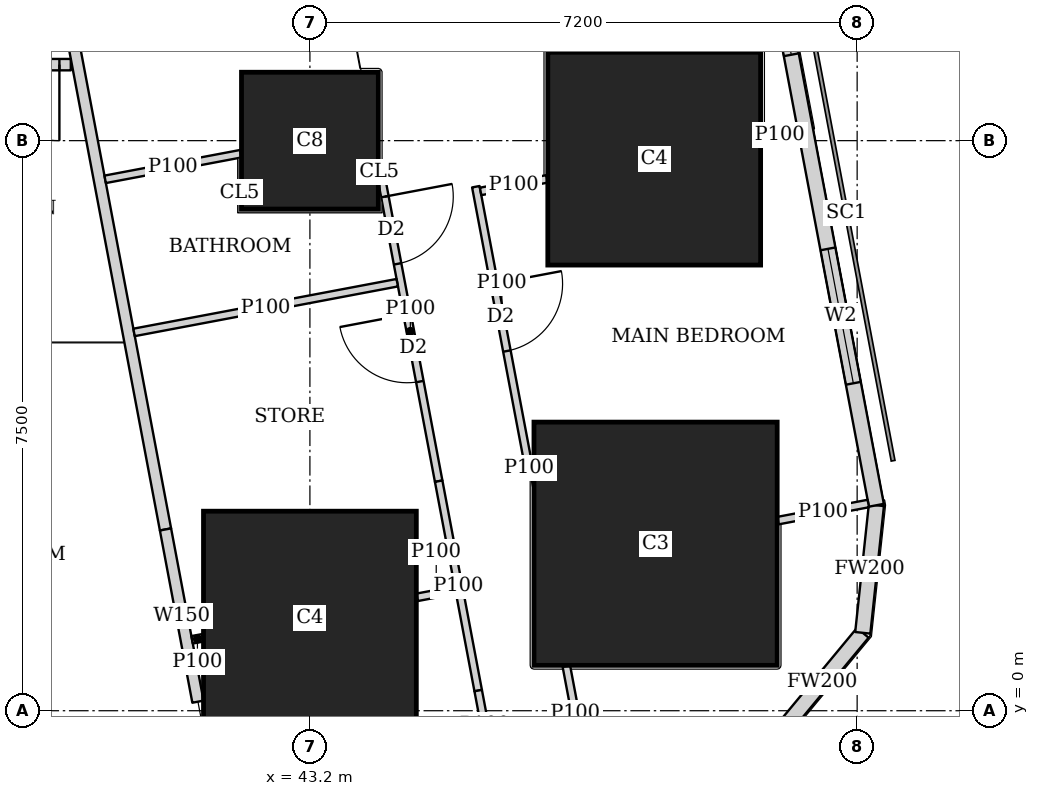
"""IFC4 building model, lengths in metres.
Left out: names, types, materials, properties, quantities, classifications, styles, units other than length and angle.
Written with IfcOpenShell. Run it as: python <this file> out.ifc"""

import sys

from ifc_helpers import new_model, si_unit, direction, frame, frame_2d, origin, origin_2d, place, context, subcontext, project, spatial, rectangle, extrude, element, fill, save


model = new_model("IFC4")
c1 = context("Model", 3, precision=1e-05, world=origin(), true_north=direction((0.0, 1.0)))
c2 = subcontext(c1, "Body", "Model", "MODEL_VIEW")
j1 = project(units=[si_unit("LENGTHUNIT", "METRE"), si_unit("PLANEANGLEUNIT", "RADIAN")], contexts=[c1])
p1 = place(None, origin())
s1 = spatial("IfcSite", under=j1, at=p1, CompositionType="ELEMENT")
p2 = place(p1, origin())
s2 = spatial("IfcBuilding", under=s1, at=p2, CompositionType="ELEMENT")
p3 = place(p2, frame((0.0, 0.0, 42.5)))
s3 = spatial("IfcBuildingStorey", under=s2, at=p3, CompositionType="ELEMENT", Elevation=42.5)
p4 = place(p3, frame((43.2, 1.225, 0.0), z_axis=(0.0, 0.0, 1.0), x_axis=(1.0, 0.0, 0.0)))
e1 = element("IfcColumn", 1, at=p4, inside=s3, PredefinedType="COLUMN", context=c2, shape_type="SweptSolid", body=[
    extrude(rectangle(XDim=2.8, YDim=2.8, at=origin_2d()), origin(), (0.0, 0.0, 1.0), 3.75),
])
p5 = place(p3, frame((47.748, 2.197, 0.0), z_axis=(0.0, 0.0, 1.0), x_axis=(1.0, 0.0, 0.0)))
e2 = element("IfcColumn", 2, at=p5, inside=s3, PredefinedType="COLUMN", context=c2, shape_type="SweptSolid", body=[
    extrude(rectangle(XDim=3.2, YDim=3.2, at=origin_2d()), origin(), (0.0, 0.0, 1.0), 3.75),
])
p6 = place(p3, frame((43.2, 7.5, 0.0), z_axis=(0.0, 0.0, 1.0), x_axis=(1.0, 0.0, 0.0)))
e3 = element("IfcColumn", 3, at=p6, inside=s3, PredefinedType="COLUMN", context=c2, shape_type="SweptSolid", body=[
    extrude(rectangle(XDim=1.8, YDim=1.8, at=origin_2d()), origin(), (0.0, 0.0, 1.0), 3.75),
])
p7 = place(p3, frame((47.73, 7.263, 0.0), z_axis=(0.0, 0.0, 1.0), x_axis=(1.0, 0.0, 0.0)))
e4 = element("IfcColumn", 4, at=p7, inside=s3, PredefinedType="COLUMN", context=c2, shape_type="SweptSolid", body=[
    extrude(rectangle(XDim=2.8, YDim=2.8, at=origin_2d()), origin(), (0.0, 0.0, 1.0), 3.75),
])
p8 = place(p3, frame((49.407, -0.263, 0.0), z_axis=(0.0, 0.0, 1.0), x_axis=(0.638042593423, 0.770001070764, 0.0)))
e5 = element("IfcWall", 5, at=p8, inside=s3, PredefinedType="SOLIDWALL", context=c2, shape_type="SweptSolid", body=[
    extrude(rectangle(XDim=1.673, YDim=0.2, at=frame_2d((0.836, 0.0))), origin(), (0.0, 0.0, 1.0), 3.5),
])
p9 = place(p3, frame((50.474, 1.025, 0.0), z_axis=(0.0, 0.0, 1.0), x_axis=(0.106047815515, 0.994361031429, 0.0)))
e6 = element("IfcWall", 6, at=p9, inside=s3, PredefinedType="SOLIDWALL", context=c2, shape_type="SweptSolid", body=[
    extrude(rectangle(XDim=1.688, YDim=0.2, at=frame_2d((0.844, 0.0))), origin(), (0.0, 0.0, 1.0), 3.5),
])
p10 = place(p3, frame((50.653, 2.703, 0.0), z_axis=(0.0, 0.0, 1.0), x_axis=(-0.185612026696, 0.982623109613, 0.0)))
e7 = element("IfcWall", 7, at=p10, inside=s3, PredefinedType="SOLIDWALL", context=c2, shape_type="SweptSolid", body=[
    extrude(rectangle(XDim=41.393, YDim=0.2, at=frame_2d((20.697, 0.0))), origin(), (0.0, 0.0, 1.0), 3.5),
])
p11 = place(p10, frame((1.633, 0.0, 0.9)))
e8 = element("IfcOpeningElement", 8, at=p11, cuts=e7, PredefinedType="OPENING", context=c2, shape_type="SweptSolid", body=[
    extrude(rectangle(XDim=1.8, YDim=1.5, at=frame_2d((0.9, 0.75))), frame((0.0, 0.11, 0.0), z_axis=(0.0, -1.0, 0.0), x_axis=(1.0, 0.0, 0.0)), (0.0, 0.0, 1.0), 0.22),
])
p12 = place(p10, frame((6.032, 0.0, 0.9)))
e9 = element("IfcOpeningElement", 9, at=p12, cuts=e7, PredefinedType="OPENING", context=c2, shape_type="SweptSolid", body=[
    extrude(rectangle(XDim=1.8, YDim=1.5, at=frame_2d((0.9, 0.75))), frame((0.0, 0.11, 0.0), z_axis=(0.0, -1.0, 0.0), x_axis=(1.0, 0.0, 0.0)), (0.0, 0.0, 1.0), 0.22),
])
p13 = place(p10, frame((9.848, 0.0, 0.9)))
e10 = element("IfcOpeningElement", 10, at=p13, cuts=e7, PredefinedType="OPENING", context=c2, shape_type="SweptSolid", body=[
    extrude(rectangle(XDim=1.8, YDim=1.5, at=frame_2d((0.9, 0.75))), frame((0.0, 0.11, 0.0), z_axis=(0.0, -1.0, 0.0), x_axis=(1.0, 0.0, 0.0)), (0.0, 0.0, 1.0), 0.22),
])
p14 = place(p10, frame((17.481, 0.0, 0.9)))
e11 = element("IfcOpeningElement", 11, at=p14, cuts=e7, PredefinedType="OPENING", context=c2, shape_type="SweptSolid", body=[
    extrude(rectangle(XDim=1.8, YDim=1.5, at=frame_2d((0.9, 0.75))), frame((0.0, 0.11, 0.0), z_axis=(0.0, -1.0, 0.0), x_axis=(1.0, 0.0, 0.0)), (0.0, 0.0, 1.0), 0.22),
])
p15 = place(p10, frame((21.297, 0.0, 0.9)))
e12 = element("IfcOpeningElement", 12, at=p15, cuts=e7, PredefinedType="OPENING", context=c2, shape_type="SweptSolid", body=[
    extrude(rectangle(XDim=1.8, YDim=1.5, at=frame_2d((0.9, 0.75))), frame((0.0, 0.11, 0.0), z_axis=(0.0, -1.0, 0.0), x_axis=(1.0, 0.0, 0.0)), (0.0, 0.0, 1.0), 0.22),
])
p16 = place(p10, frame((25.113, 0.0, 0.9)))
e13 = element("IfcOpeningElement", 13, at=p16, cuts=e7, PredefinedType="OPENING", context=c2, shape_type="SweptSolid", body=[
    extrude(rectangle(XDim=1.8, YDim=1.5, at=frame_2d((0.9, 0.75))), frame((0.0, 0.11, 0.0), z_axis=(0.0, -1.0, 0.0), x_axis=(1.0, 0.0, 0.0)), (0.0, 0.0, 1.0), 0.22),
])
p17 = place(p10, frame((28.93, 0.0, 0.9)))
e14 = element("IfcOpeningElement", 14, at=p17, cuts=e7, PredefinedType="OPENING", context=c2, shape_type="SweptSolid", body=[
    extrude(rectangle(XDim=1.8, YDim=1.5, at=frame_2d((0.9, 0.75))), frame((0.0, 0.11, 0.0), z_axis=(0.0, -1.0, 0.0), x_axis=(1.0, 0.0, 0.0)), (0.0, 0.0, 1.0), 0.22),
])
p18 = place(p10, frame((32.746, 0.0, 0.9)))
e15 = element("IfcOpeningElement", 15, at=p18, cuts=e7, PredefinedType="OPENING", context=c2, shape_type="SweptSolid", body=[
    extrude(rectangle(XDim=1.8, YDim=1.5, at=frame_2d((0.9, 0.75))), frame((0.0, 0.11, 0.0), z_axis=(0.0, -1.0, 0.0), x_axis=(1.0, 0.0, 0.0)), (0.0, 0.0, 1.0), 0.22),
])
p19 = place(p10, frame((36.481, 0.0, 0.9)))
e16 = element("IfcOpeningElement", 16, at=p19, cuts=e7, PredefinedType="OPENING", context=c2, shape_type="SweptSolid", body=[
    extrude(rectangle(XDim=1.8, YDim=1.5, at=frame_2d((0.9, 0.75))), frame((0.0, 0.11, 0.0), z_axis=(0.0, -1.0, 0.0), x_axis=(1.0, 0.0, 0.0)), (0.0, 0.0, 1.0), 0.22),
])
p20 = place(p3, frame((40.054, 8.5, 0.0), z_axis=(0.0, 0.0, 1.0), x_axis=(-1.0, 0.0, 0.0)))
e17 = element("IfcWall", 17, at=p20, inside=s3, PredefinedType="SOLIDWALL", context=c2, shape_type="SweptSolid", body=[
    extrude(rectangle(XDim=31.704, YDim=0.15, at=frame_2d((15.852, 0.0))), origin(), (0.0, 0.0, 1.0), 3.5),
])
p21 = place(p20, frame((27.321, 0.0, 0.0)))
e18 = element("IfcOpeningElement", 18, at=p21, cuts=e17, PredefinedType="OPENING", context=c2, shape_type="SweptSolid", body=[
    extrude(rectangle(XDim=1.0, YDim=2.1, at=frame_2d((0.5, 1.05))), frame((0.0, 0.085, 0.0), z_axis=(0.0, -1.0, 0.0), x_axis=(1.0, 0.0, 0.0)), (0.0, 0.0, 1.0), 0.17),
])
p22 = place(p20, frame((23.054, 0.0, 0.0)))
e19 = element("IfcOpeningElement", 19, at=p22, cuts=e17, PredefinedType="OPENING", context=c2, shape_type="SweptSolid", body=[
    extrude(rectangle(XDim=1.0, YDim=2.1, at=frame_2d((0.5, 1.05))), frame((0.0, 0.085, 0.0), z_axis=(0.0, -1.0, 0.0), x_axis=(1.0, 0.0, 0.0)), (0.0, 0.0, 1.0), 0.17),
])
p23 = place(p20, frame((15.854, 0.0, 0.0)))
e20 = element("IfcOpeningElement", 20, at=p23, cuts=e17, PredefinedType="OPENING", context=c2, shape_type="SweptSolid", body=[
    extrude(rectangle(XDim=1.0, YDim=2.1, at=frame_2d((0.5, 1.05))), frame((0.0, 0.085, 0.0), z_axis=(0.0, -1.0, 0.0), x_axis=(1.0, 0.0, 0.0)), (0.0, 0.0, 1.0), 0.17),
])
p24 = place(p20, frame((8.654, 0.0, 0.0)))
e21 = element("IfcOpeningElement", 21, at=p24, cuts=e17, PredefinedType="OPENING", context=c2, shape_type="SweptSolid", body=[
    extrude(rectangle(XDim=1.0, YDim=2.1, at=frame_2d((0.5, 1.05))), frame((0.0, 0.085, 0.0), z_axis=(0.0, -1.0, 0.0), x_axis=(1.0, 0.0, 0.0)), (0.0, 0.0, 1.0), 0.17),
])
p25 = place(p20, frame((0.15, 0.0, 0.0)))
e22 = element("IfcOpeningElement", 22, at=p25, cuts=e17, PredefinedType="OPENING", context=c2, shape_type="SweptSolid", body=[
    extrude(rectangle(XDim=1.0, YDim=2.1, at=frame_2d((0.5, 1.05))), frame((0.0, 0.085, 0.0), z_axis=(0.0, -1.0, 0.0), x_axis=(1.0, 0.0, 0.0)), (0.0, 0.0, 1.0), 0.17),
])
p26 = place(p3, frame((33.68, 42.723, 0.0), z_axis=(0.0, 0.0, 1.0), x_axis=(0.185624129307, -0.98262082342, 0.0)))
e23 = element("IfcWall", 23, at=p26, inside=s3, PredefinedType="SOLIDWALL", context=c2, shape_type="SweptSolid", body=[
    extrude(rectangle(XDim=41.051, YDim=0.15, at=frame_2d((20.526, 0.0))), origin(), (0.0, 0.0, 1.0), 2.5),
])
p27 = place(p26, frame((7.73, 0.0, 0.0)))
e24 = element("IfcOpeningElement", 24, at=p27, cuts=e23, PredefinedType="OPENING", context=c2, shape_type="SweptSolid", body=[
    extrude(rectangle(XDim=1.0, YDim=2.1, at=frame_2d((0.5, 1.05))), frame((0.0, 0.085, 0.0), z_axis=(0.0, -1.0, 0.0), x_axis=(1.0, 0.0, 0.0)), (0.0, 0.0, 1.0), 0.17),
])
p28 = place(p26, frame((12.307, 0.0, 0.0)))
e25 = element("IfcOpeningElement", 25, at=p28, cuts=e23, PredefinedType="OPENING", context=c2, shape_type="SweptSolid", body=[
    extrude(rectangle(XDim=1.0, YDim=2.1, at=frame_2d((0.5, 1.05))), frame((0.0, 0.085, 0.0), z_axis=(0.0, -1.0, 0.0), x_axis=(1.0, 0.0, 0.0)), (0.0, 0.0, 1.0), 0.17),
])
p29 = place(p26, frame((19.938, 0.0, 0.0)))
e26 = element("IfcOpeningElement", 26, at=p29, cuts=e23, PredefinedType="OPENING", context=c2, shape_type="SweptSolid", body=[
    extrude(rectangle(XDim=1.0, YDim=2.1, at=frame_2d((0.5, 1.05))), frame((0.0, 0.085, 0.0), z_axis=(0.0, -1.0, 0.0), x_axis=(1.0, 0.0, 0.0)), (0.0, 0.0, 1.0), 0.17),
])
p30 = place(p26, frame((32.193, 0.0, 0.0)))
e27 = element("IfcOpeningElement", 27, at=p30, cuts=e23, PredefinedType="OPENING", context=c2, shape_type="SweptSolid", body=[
    extrude(rectangle(XDim=1.0, YDim=2.1, at=frame_2d((0.5, 1.05))), frame((0.0, 0.085, 0.0), z_axis=(0.0, -1.0, 0.0), x_axis=(1.0, 0.0, 0.0)), (0.0, 0.0, 1.0), 0.17),
])
p31 = place(p3, frame((41.3, 2.385, 0.0), z_axis=(0.0, 0.0, 1.0), x_axis=(0.185170596553, -0.982706390624, 0.0)))
e28 = element("IfcWall", 28, at=p31, inside=s3, PredefinedType="SOLIDWALL", context=c2, shape_type="SweptSolid", body=[
    extrude(rectangle(XDim=2.306, YDim=0.15, at=frame_2d((1.153, 0.0))), origin(), (0.0, 0.0, 1.0), 2.05),
])
p32 = place(p3, frame((45.383, 6.894, 0.0), z_axis=(0.0, 0.0, 1.0), x_axis=(0.185791461635, -0.982589198385, 0.0)))
e29 = element("IfcWall", 29, at=p32, inside=s3, PredefinedType="PARTITIONING", context=c2, shape_type="SweptSolid", body=[
    extrude(rectangle(XDim=3.687, YDim=0.1, at=frame_2d((1.844, 0.0))), origin(), (0.0, 0.0, 1.0), 3.5),
])
p33 = place(p32, frame((1.3, 0.0, 0.0)))
e30 = element("IfcOpeningElement", 30, at=p33, cuts=e29, PredefinedType="OPENING", context=c2, shape_type="SweptSolid", body=[
    extrude(rectangle(XDim=0.9, YDim=2.1, at=frame_2d((0.45, 1.05))), frame((0.0, 0.06, 0.0), z_axis=(0.0, -1.0, 0.0), x_axis=(1.0, 0.0, 0.0)), (0.0, 0.0, 1.0), 0.12),
])
p34 = place(p3, frame((46.068, 3.271, 0.0), z_axis=(0.0, 0.0, 1.0), x_axis=(0.183590240121, -0.98300286049, 0.0)))
e31 = element("IfcWall", 31, at=p34, inside=s3, PredefinedType="PARTITIONING", context=c2, shape_type="SweptSolid", body=[
    extrude(rectangle(XDim=0.169, YDim=0.1, at=frame_2d((0.084, 0.0))), origin(), (0.0, 0.0, 1.0), 2.05),
])
p35 = place(p3, frame((46.574, 0.587, 0.0), z_axis=(0.0, 0.0, 1.0), x_axis=(0.185997942803, -0.98255013372, 0.0)))
e32 = element("IfcWall", 32, at=p35, inside=s3, PredefinedType="PARTITIONING", context=c2, shape_type="SweptSolid", body=[
    extrude(rectangle(XDim=1.259, YDim=0.1, at=frame_2d((0.629, 0.0))), origin(), (0.0, 0.0, 1.0), 2.05),
])
p36 = place(p3, frame((44.149, 6.96, 0.0), z_axis=(0.0, 0.0, 1.0), x_axis=(0.185824941804, -0.982582867245, 0.0)))
e33 = element("IfcWall", 33, at=p36, inside=s3, PredefinedType="PARTITIONING", context=c2, shape_type="SweptSolid", body=[
    extrude(rectangle(XDim=4.01, YDim=0.1, at=frame_2d((2.005, 0.0))), origin(), (0.0, 0.0, 1.0), 3.5),
])
p37 = place(p36, frame((0.2, 0.0, 0.0)))
e34 = element("IfcOpeningElement", 34, at=p37, cuts=e33, PredefinedType="OPENING", context=c2, shape_type="SweptSolid", body=[
    extrude(rectangle(XDim=0.9, YDim=2.1, at=frame_2d((0.45, 1.05))), frame((0.0, 0.06, 0.0), z_axis=(0.0, -1.0, 0.0), x_axis=(1.0, 0.0, 0.0)), (0.0, 0.0, 1.0), 0.12),
])
p38 = place(p36, frame((1.776, 0.0, 0.0)))
e35 = element("IfcOpeningElement", 35, at=p38, cuts=e33, PredefinedType="OPENING", context=c2, shape_type="SweptSolid", body=[
    extrude(rectangle(XDim=0.9, YDim=2.1, at=frame_2d((0.45, 1.05))), frame((0.0, 0.06, 0.0), z_axis=(0.0, -1.0, 0.0), x_axis=(1.0, 0.0, 0.0)), (0.0, 0.0, 1.0), 0.12),
])
p39 = place(p3, frame((44.894, 3.02, 0.0), z_axis=(0.0, 0.0, 1.0), x_axis=(0.185471317237, -0.982649678412, 0.0)))
e36 = element("IfcWall", 36, at=p39, inside=s3, PredefinedType="PARTITIONING", context=c2, shape_type="SweptSolid", body=[
    extrude(rectangle(XDim=2.804, YDim=0.1, at=frame_2d((1.402, 0.0))), origin(), (0.0, 0.0, 1.0), 2.05),
])
p40 = place(p3, frame((45.414, 0.265, 0.0), z_axis=(0.0, 0.0, 1.0), x_axis=(0.185665855771, -0.982612940074, 0.0)))
e37 = element("IfcWall", 37, at=p40, inside=s3, PredefinedType="PARTITIONING", context=c2, shape_type="SweptSolid", body=[
    extrude(rectangle(XDim=0.931, YDim=0.1, at=frame_2d((0.465, 0.0))), origin(), (0.0, 0.0, 1.0), 3.5),
])
p41 = place(p3, frame((49.622, 7.62, 0.0), z_axis=(0.0, 0.0, 1.0), x_axis=(-0.982629142467, -0.185580086147, 0.0)))
e38 = element("IfcWall", 38, at=p41, inside=s3, PredefinedType="PARTITIONING", context=c2, shape_type="SweptSolid", body=[
    extrude(rectangle(XDim=0.491, YDim=0.1, at=frame_2d((0.245, 0.0))), origin(), (0.0, 0.0, 1.0), 3.5),
])
p42 = place(p3, frame((46.32, 6.997, 0.0), z_axis=(0.0, 0.0, 1.0), x_axis=(-0.982635224332, -0.185547880349, 0.0)))
e39 = element("IfcWall", 39, at=p42, inside=s3, PredefinedType="PARTITIONING", context=c2, shape_type="SweptSolid", body=[
    extrude(rectangle(XDim=0.889, YDim=0.1, at=frame_2d((0.445, 0.0))), origin(), (0.0, 0.0, 1.0), 3.5),
])
p43 = place(p3, frame((50.547, 2.726, 0.0), z_axis=(0.0, 0.0, 1.0), x_axis=(-0.982553313503, -0.185981144539, 0.0)))
e40 = element("IfcWall", 40, at=p43, inside=s3, PredefinedType="PARTITIONING", context=c2, shape_type="SweptSolid", body=[
    extrude(rectangle(XDim=1.21, YDim=0.1, at=frame_2d((0.605, 0.0))), origin(), (0.0, 0.0, 1.0), 3.5),
])
p44 = place(p3, frame((42.29, 7.328, 0.0), z_axis=(0.0, 0.0, 1.0), x_axis=(-0.98262927905, -0.185579362952, 0.0)))
e41 = element("IfcWall", 41, at=p44, inside=s3, PredefinedType="PARTITIONING", context=c2, shape_type="SweptSolid", body=[
    extrude(rectangle(XDim=1.815, YDim=0.1, at=frame_2d((0.908, 0.0))), origin(), (0.0, 0.0, 1.0), 3.5),
])
p45 = place(p3, frame((45.114, 1.587, 0.0), z_axis=(0.0, 0.0, 1.0), x_axis=(-0.982699277433, -0.185208342501, 0.0)))
e42 = element("IfcWall", 42, at=p45, inside=s3, PredefinedType="PARTITIONING", context=c2, shape_type="SweptSolid", body=[
    extrude(rectangle(XDim=0.513, YDim=0.1, at=frame_2d((0.256, 0.0))), origin(), (0.0, 0.0, 1.0), 2.05),
])
p46 = place(p3, frame((41.79, 0.959, 0.0), z_axis=(0.0, 0.0, 1.0), x_axis=(-0.983372768072, -0.181598455428, 0.0)))
e43 = element("IfcWall", 43, at=p46, inside=s3, PredefinedType="PARTITIONING", context=c2, shape_type="SweptSolid", body=[
    extrude(rectangle(XDim=0.143, YDim=0.1, at=frame_2d((0.071, 0.0))), origin(), (0.0, 0.0, 1.0), 2.05),
])
p47 = place(p3, frame((44.349, 5.631, 0.0), z_axis=(0.0, 0.0, 1.0), x_axis=(-0.982629014545, -0.18558076348, 0.0)))
e44 = element("IfcWall", 44, at=p47, inside=s3, PredefinedType="PARTITIONING", context=c2, shape_type="SweptSolid", body=[
    extrude(rectangle(XDim=3.524, YDim=0.1, at=frame_2d((1.762, 0.0))), origin(), (0.0, 0.0, 1.0), 3.5),
])
p48 = place(p11, origin())
e45 = element("IfcWindow", 45, at=p48, inside=s3, PartitioningType="SINGLE_PANEL", PredefinedType="WINDOW", context=c2, shape_type="SweptSolid", body=[
    extrude(rectangle(XDim=1.8, YDim=1.5, at=frame_2d((0.9, 0.75))), frame((0.0, 0.03, 0.0), z_axis=(0.0, -1.0, 0.0), x_axis=(1.0, 0.0, 0.0)), (0.0, 0.0, 1.0), 0.06),
])
fill(e8, e45)
p49 = place(p12, origin())
e46 = element("IfcWindow", 46, at=p49, inside=s3, PartitioningType="SINGLE_PANEL", PredefinedType="WINDOW", context=c2, shape_type="SweptSolid", body=[
    extrude(rectangle(XDim=1.8, YDim=1.5, at=frame_2d((0.9, 0.75))), frame((0.0, 0.03, 0.0), z_axis=(0.0, -1.0, 0.0), x_axis=(1.0, 0.0, 0.0)), (0.0, 0.0, 1.0), 0.06),
])
fill(e9, e46)
p50 = place(p25, origin())
e47 = element("IfcDoor", 47, at=p50, inside=s3, OperationType="SINGLE_SWING_LEFT", PredefinedType="DOOR", context=c2, shape_type="SweptSolid", body=[
    extrude(rectangle(XDim=1.0, YDim=2.1, at=frame_2d((0.5, 1.05))), frame((0.0, 0.025, 0.0), z_axis=(0.0, -1.0, 0.0), x_axis=(1.0, 0.0, 0.0)), (0.0, 0.0, 1.0), 0.05),
])
fill(e22, e47)
p51 = place(p33, origin())
e48 = element("IfcDoor", 48, at=p51, inside=s3, OperationType="SINGLE_SWING_LEFT", PredefinedType="DOOR", context=c2, shape_type="SweptSolid", body=[
    extrude(rectangle(XDim=0.9, YDim=2.1, at=frame_2d((0.45, 1.05))), frame((0.0, 0.025, 0.0), z_axis=(0.0, -1.0, 0.0), x_axis=(1.0, 0.0, 0.0)), (0.0, 0.0, 1.0), 0.05),
])
fill(e30, e48)
p52 = place(p37, origin())
e49 = element("IfcDoor", 49, at=p52, inside=s3, OperationType="SINGLE_SWING_LEFT", PredefinedType="DOOR", context=c2, shape_type="SweptSolid", body=[
    extrude(rectangle(XDim=0.9, YDim=2.1, at=frame_2d((0.45, 1.05))), frame((0.0, 0.025, 0.0), z_axis=(0.0, -1.0, 0.0), x_axis=(1.0, 0.0, 0.0)), (0.0, 0.0, 1.0), 0.05),
])
fill(e34, e49)
p53 = place(p38, origin())
e50 = element("IfcDoor", 50, at=p53, inside=s3, OperationType="SINGLE_SWING_RIGHT", PredefinedType="DOOR", context=c2, shape_type="SweptSolid", body=[
    extrude(rectangle(XDim=0.9, YDim=2.1, at=frame_2d((0.45, 1.05))), frame((0.0, 0.025, 0.0), z_axis=(0.0, -1.0, 0.0), x_axis=(1.0, 0.0, 0.0)), (0.0, 0.0, 1.0), 0.05),
])
fill(e35, e50)
save(model, sys.argv[1])
